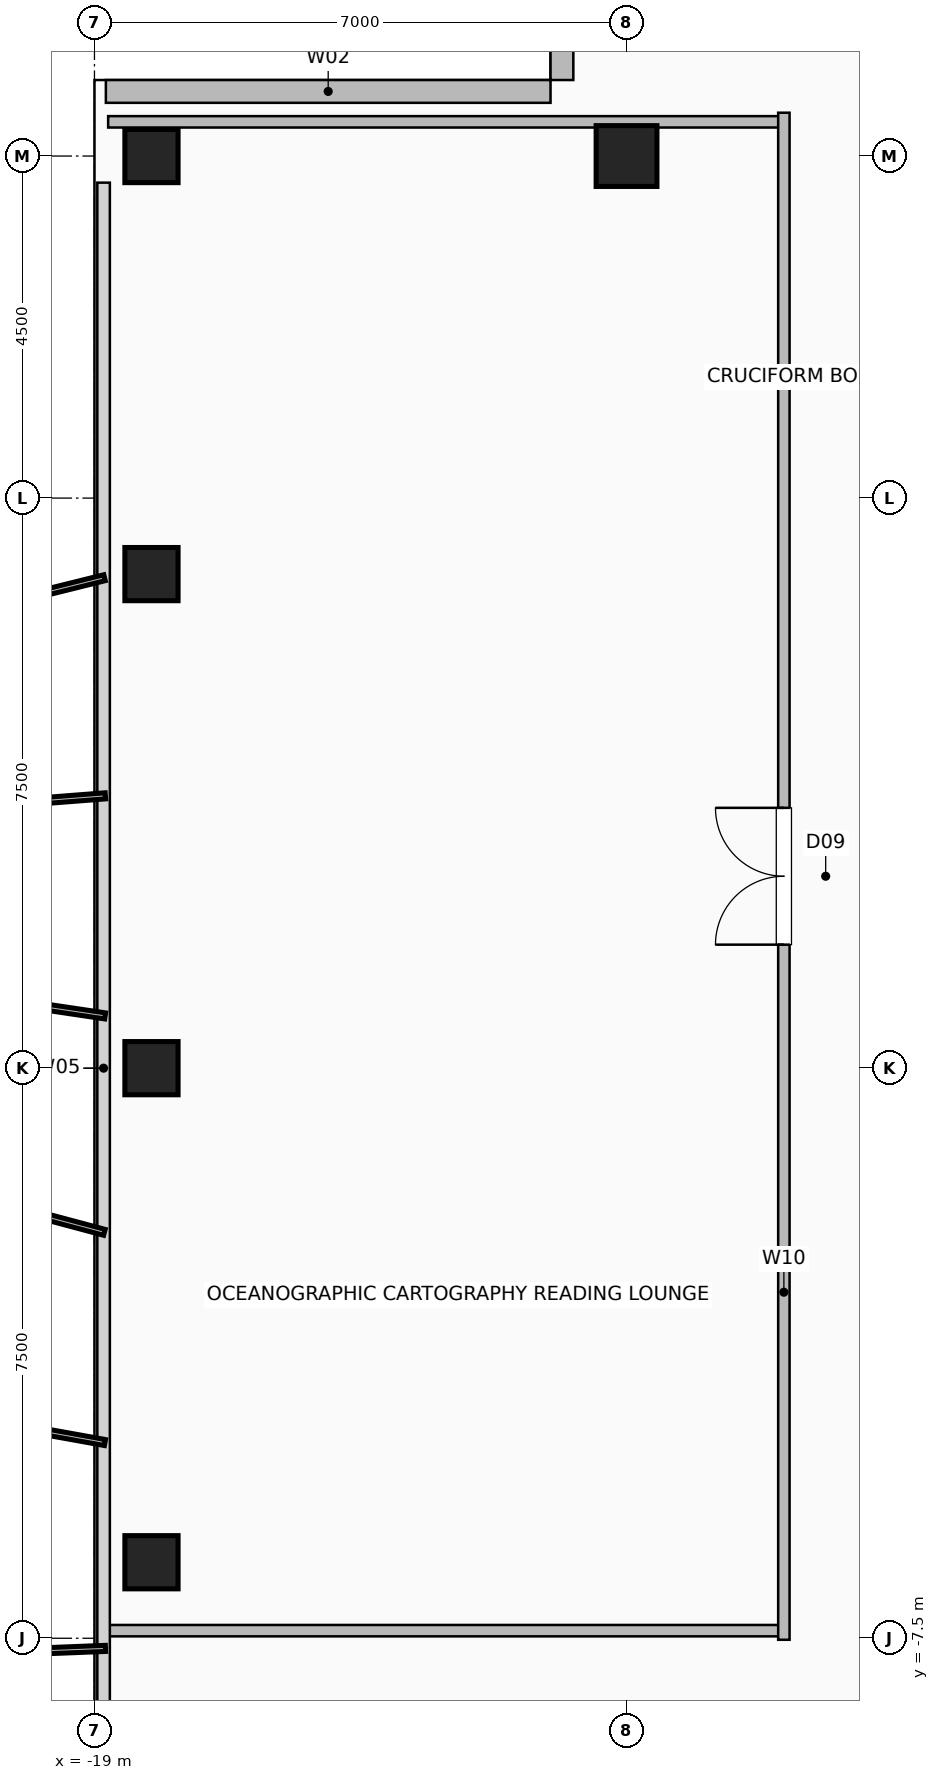
"""IFC4 building model, lengths in metres.
Left out: names, types, materials, properties, quantities, classifications, styles, units other than length and angle.
Written with IfcOpenShell. Run it as: python <this file> out.ifc"""

import sys

from ifc_helpers import new_model, si_unit, direction, frame, frame_2d, origin, origin_2d, place, context, subcontext, project, spatial, rectangle, hollow_rectangle, extrude, element, fill, save


model = new_model("IFC4")
c1 = context("Model", 3, precision=1e-05, world=origin(), true_north=direction((0.0, 1.0)))
c2 = subcontext(c1, "Body", "Model", "MODEL_VIEW")
j1 = project(units=[si_unit("LENGTHUNIT", "METRE"), si_unit("PLANEANGLEUNIT", "RADIAN")], contexts=[c1])
p1 = place(None, origin())
s1 = spatial("IfcSite", under=j1, at=p1, CompositionType="ELEMENT")
p2 = place(p1, origin())
s2 = spatial("IfcBuilding", under=s1, at=p2, CompositionType="ELEMENT")
p3 = place(p2, frame((0.0, 0.0, 272.0)))
s3 = spatial("IfcBuildingStorey", under=s2, at=p3, CompositionType="ELEMENT", Elevation=272.0)
for number, where, z_axis, x_axis in (
    (1, (-18.25, -6.5, 0.0), (0.0, 0.0, 1.0), (1.0, 0.0, 0.0)),
    (2, (-18.25, 0.0, 0.0), (0.0, 0.0, 1.0), (1.0, 0.0, 0.0)),
    (3, (-18.25, 6.5, 0.0), (0.0, 0.0, 1.0), (1.0, 0.0, 0.0)),
    (4, (-18.25, 12.0, 0.0), (0.0, 0.0, 1.0), (1.0, 0.0, 0.0)),
):
    element("IfcColumn", number, at=place(p3, frame(where, z_axis=z_axis, x_axis=x_axis)), inside=s3, PredefinedType="COLUMN", context=c2, shape_type="SweptSolid", body=[
        extrude(hollow_rectangle(XDim=0.7, YDim=0.7, WallThickness=0.035, at=origin_2d()), origin(), (0.0, 0.0, 1.0), 3.6),
    ])
p4 = place(p3, frame((-12.0, 12.0, 0.0), z_axis=(0.0, 0.0, 1.0), x_axis=(1.0, 0.0, 0.0)))
e5 = element("IfcColumn", 5, at=p4, inside=s3, PredefinedType="COLUMN", context=c2, shape_type="SweptSolid", body=[
    extrude(hollow_rectangle(XDim=0.8, YDim=0.8, WallThickness=0.04, at=origin_2d()), origin(), (0.0, 0.0, 1.0), 3.6),
])
p5 = place(p3, frame((-12.85, 18.85, 0.0), z_axis=(0.0, 0.0, 1.0), x_axis=(0.0, -1.0, 0.0)))
e6 = element("IfcWall", 6, at=p5, inside=s3, PredefinedType="SOLIDWALL", context=c2, shape_type="SweptSolid", body=[
    extrude(rectangle(XDim=5.85, YDim=0.3, at=frame_2d((2.925, 0.0))), origin(), (0.0, 0.0, 1.0), 3.36),
])
p6 = place(p5, frame((2.175, 0.0, 0.9)))
e7 = element("IfcOpeningElement", 7, at=p6, cuts=e6, PredefinedType="OPENING", context=c2, shape_type="SweptSolid", body=[
    extrude(rectangle(XDim=1.5, YDim=1.8, at=frame_2d((0.75, 0.9))), frame((0.0, 0.16, 0.0), z_axis=(0.0, -1.0, 0.0), x_axis=(1.0, 0.0, 0.0)), (0.0, 0.0, 1.0), 0.32),
])
p7 = place(p3, frame((-18.85, 12.85, 0.0), z_axis=(0.0, 0.0, 1.0), x_axis=(1.0, 0.0, 0.0)))
e8 = element("IfcWall", 8, at=p7, inside=s3, PredefinedType="SOLIDWALL", context=c2, shape_type="SweptSolid", body=[
    extrude(rectangle(XDim=5.85, YDim=0.3, at=frame_2d((2.925, 0.0))), origin(), (0.0, 0.0, 1.0), 3.36),
])
for number, where, z_axis, x_axis in (
    (9, (-18.82, -7.4, 0.0), (0.0, 0.0, 1.0), (1.0, 0.0, 0.0)),
    (10, (-18.82, 12.45, 0.0), (0.0, 0.0, 1.0), (1.0, 0.0, 0.0)),
):
    element("IfcWall", number, at=place(p3, frame(where, z_axis=z_axis, x_axis=x_axis)), inside=s3, PredefinedType="PARTITIONING", context=c2, shape_type="SweptSolid", body=[
        extrude(rectangle(XDim=8.89, YDim=0.15, at=frame_2d((4.445, 0.0))), origin(), (0.0, 0.0, 1.0), 3.36),
    ])
p8 = place(p3, frame((-9.93, -7.52, 0.0), z_axis=(0.0, 0.0, 1.0), x_axis=(0.0, 1.0, 0.0)))
e11 = element("IfcWall", 11, at=p8, inside=s3, PredefinedType="PARTITIONING", context=c2, shape_type="SweptSolid", body=[
    extrude(rectangle(XDim=20.09, YDim=0.15, at=frame_2d((10.045, 0.0))), origin(), (0.0, 0.0, 1.0), 3.36),
])
p9 = place(p8, frame((9.145, 0.0, 0.0)))
e12 = element("IfcOpeningElement", 12, at=p9, cuts=e11, PredefinedType="OPENING", context=c2, shape_type="SweptSolid", body=[
    extrude(rectangle(XDim=1.8, YDim=2.08, at=frame_2d((0.9, 1.04))), frame((0.0, 0.085, 0.0), z_axis=(0.0, -1.0, 0.0), x_axis=(1.0, 0.0, 0.0)), (0.0, 0.0, 1.0), 0.17),
])
p10 = place(p9, origin())
e13 = element("IfcDoor", 13, at=p10, inside=s3, OperationType="DOUBLE_DOOR_SINGLE_SWING", PredefinedType="DOOR", context=c2, shape_type="SweptSolid", body=[
    extrude(rectangle(XDim=1.8, YDim=2.08, at=frame_2d((0.9, 1.04))), frame((0.0, 0.025, 0.0), z_axis=(0.0, -1.0, 0.0), x_axis=(1.0, 0.0, 0.0)), (0.0, 0.0, 1.0), 0.05),
])
fill(e12, e13)
save(model, sys.argv[1])
